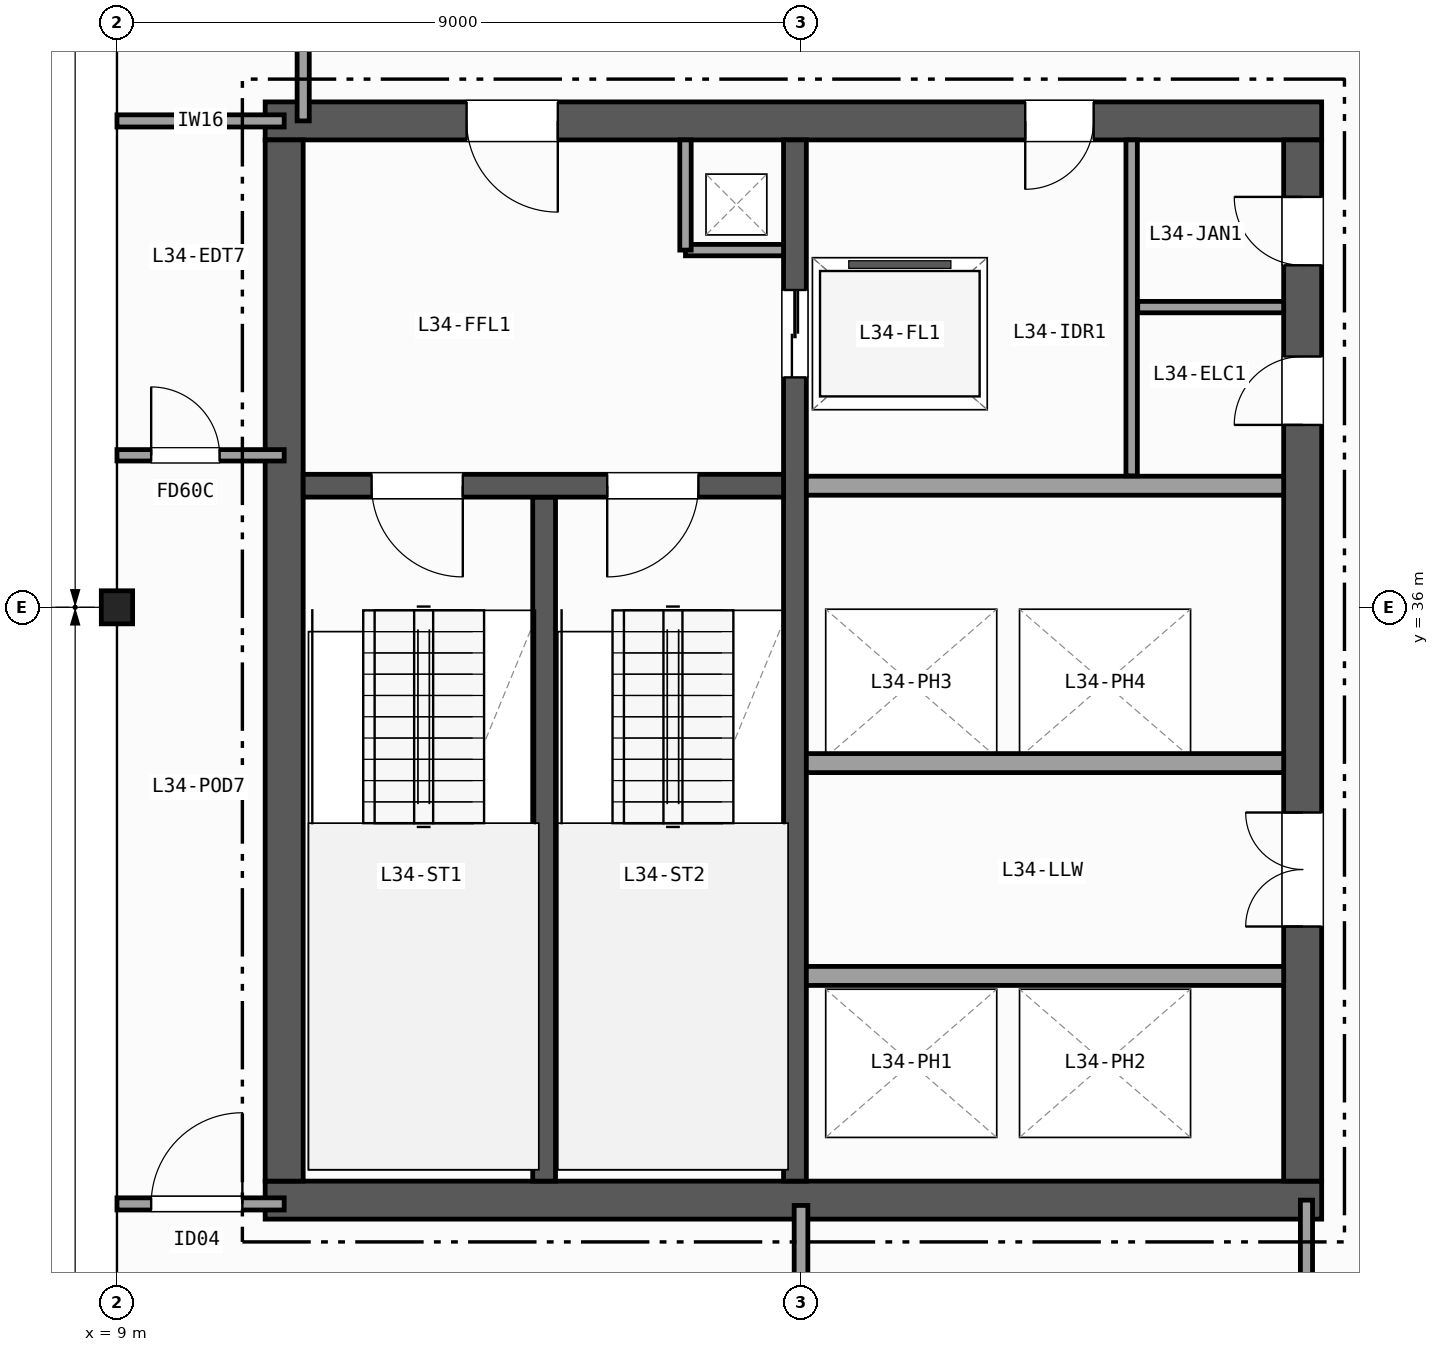
"""IFC4 building model, lengths in metres.
Left out: names, types, materials, properties, quantities, classifications, styles, units other than length and angle.
Written with IfcOpenShell. Run it as: python <this file> out.ifc"""

import sys

from ifc_helpers import new_model, si_unit, direction, frame, frame_2d, origin, origin_2d, place, context, subcontext, project, spatial, rectangle, i_section, extrude, element, fill, save


model = new_model("IFC4")
c1 = context("Model", 3, precision=1e-05, world=origin(), true_north=direction((0.0, 1.0)))
c2 = subcontext(c1, "Body", "Model", "MODEL_VIEW")
j1 = project(units=[si_unit("LENGTHUNIT", "METRE"), si_unit("PLANEANGLEUNIT", "RADIAN")], contexts=[c1])
p1 = place(None, origin())
s1 = spatial("IfcSite", under=j1, at=p1, CompositionType="ELEMENT")
p2 = place(p1, origin())
s2 = spatial("IfcBuilding", under=s1, at=p2, CompositionType="ELEMENT")
p3 = place(p2, frame((0.0, 0.0, 139.6)))
s3 = spatial("IfcBuildingStorey", under=s2, at=p3, CompositionType="ELEMENT", Elevation=139.6)
p4 = place(p3, frame((9.0, 36.0, 0.0), z_axis=(0.0, 0.0, 1.0), x_axis=(1.0, 0.0, 0.0)))
e1 = element("IfcColumn", 1, at=p4, inside=s3, PredefinedType="COLUMN", context=c2, shape_type="SweptSolid", body=[
    extrude(i_section(OverallWidth=0.412, OverallDepth=0.435, WebThickness=0.036, FlangeThickness=0.057, FilletRadius=0.015, at=origin_2d()), origin(), (0.0, 0.0, 1.0), 3.7),
])
p5 = place(p3, frame((10.95, 28.2, 0.0), z_axis=(0.0, 0.0, 1.0), x_axis=(1.0, 0.0, 0.0)))
e2 = element("IfcWall", 2, at=p5, inside=s3, PredefinedType="SHEAR", context=c2, shape_type="SweptSolid", body=[
    extrude(rectangle(XDim=13.9, YDim=0.5, at=frame_2d((6.95, 0.0))), origin(), (0.0, 0.0, 1.0), 3.42),
])
p6 = place(p3, frame((24.85, 42.4, 0.0), z_axis=(0.0, 0.0, 1.0), x_axis=(-1.0, 0.0, 0.0)))
e3 = element("IfcWall", 3, at=p6, inside=s3, PredefinedType="SHEAR", context=c2, shape_type="SweptSolid", body=[
    extrude(rectangle(XDim=13.9, YDim=0.5, at=frame_2d((6.95, 0.0))), origin(), (0.0, 0.0, 1.0), 3.42),
])
p7 = place(p6, frame((10.05, 0.0, 0.0)))
e4 = element("IfcOpeningElement", 4, at=p7, cuts=e3, PredefinedType="OPENING", context=c2, shape_type="SweptSolid", body=[
    extrude(rectangle(XDim=1.2, YDim=2.15, at=frame_2d((0.6, 1.075))), frame((0.0, 0.26, 0.0), z_axis=(0.0, -1.0, 0.0), x_axis=(1.0, 0.0, 0.0)), (0.0, 0.0, 1.0), 0.52),
])
p8 = place(p6, frame((3.0, 0.0, 0.0)))
e5 = element("IfcOpeningElement", 5, at=p8, cuts=e3, PredefinedType="OPENING", context=c2, shape_type="SweptSolid", body=[
    extrude(rectangle(XDim=0.9, YDim=2.1, at=frame_2d((0.45, 1.05))), frame((0.0, 0.26, 0.0), z_axis=(0.0, -1.0, 0.0), x_axis=(1.0, 0.0, 0.0)), (0.0, 0.0, 1.0), 0.52),
])
p9 = place(p3, frame((11.2, 42.15, 0.0), z_axis=(0.0, 0.0, 1.0), x_axis=(0.0, -1.0, 0.0)))
e6 = element("IfcWall", 6, at=p9, inside=s3, PredefinedType="SHEAR", context=c2, shape_type="SweptSolid", body=[
    extrude(rectangle(XDim=13.7, YDim=0.5, at=frame_2d((6.85, 0.0))), origin(), (0.0, 0.0, 1.0), 3.42),
])
p10 = place(p3, frame((24.6, 28.45, 0.0), z_axis=(0.0, 0.0, 1.0), x_axis=(0.0, 1.0, 0.0)))
e7 = element("IfcWall", 7, at=p10, inside=s3, PredefinedType="SHEAR", context=c2, shape_type="SweptSolid", body=[
    extrude(rectangle(XDim=13.7, YDim=0.5, at=frame_2d((6.85, 0.0))), origin(), (0.0, 0.0, 1.0), 3.42),
])
p11 = place(p10, frame((3.35, 0.0, 0.0)))
e8 = element("IfcOpeningElement", 8, at=p11, cuts=e7, PredefinedType="OPENING", context=c2, shape_type="SweptSolid", body=[
    extrude(rectangle(XDim=1.5, YDim=2.2, at=frame_2d((0.75, 1.1))), frame((0.0, 0.26, 0.0), z_axis=(0.0, -1.0, 0.0), x_axis=(1.0, 0.0, 0.0)), (0.0, 0.0, 1.0), 0.52),
])
p12 = place(p10, frame((9.95, 0.0, 0.0)))
e9 = element("IfcOpeningElement", 9, at=p12, cuts=e7, PredefinedType="OPENING", context=c2, shape_type="SweptSolid", body=[
    extrude(rectangle(XDim=0.9, YDim=2.1, at=frame_2d((0.45, 1.05))), frame((0.0, 0.26, 0.0), z_axis=(0.0, -1.0, 0.0), x_axis=(1.0, 0.0, 0.0)), (0.0, 0.0, 1.0), 0.52),
])
p13 = place(p10, frame((12.05, 0.0, 0.0)))
e10 = element("IfcOpeningElement", 10, at=p13, cuts=e7, PredefinedType="OPENING", context=c2, shape_type="SweptSolid", body=[
    extrude(rectangle(XDim=0.9, YDim=2.1, at=frame_2d((0.45, 1.05))), frame((0.0, 0.26, 0.0), z_axis=(0.0, -1.0, 0.0), x_axis=(1.0, 0.0, 0.0)), (0.0, 0.0, 1.0), 0.52),
])
p14 = place(p3, frame((14.62, 28.45, 0.0), z_axis=(0.0, 0.0, 1.0), x_axis=(0.0, 1.0, 0.0)))
e11 = element("IfcWall", 11, at=p14, inside=s3, PredefinedType="SHEAR", context=c2, shape_type="SweptSolid", body=[
    extrude(rectangle(XDim=9.0, YDim=0.3, at=frame_2d((4.5, 0.0))), origin(), (0.0, 0.0, 1.0), 3.42),
])
p15 = place(p3, frame((17.92, 42.15, 0.0), z_axis=(0.0, 0.0, 1.0), x_axis=(0.0, -1.0, 0.0)))
e12 = element("IfcWall", 12, at=p15, inside=s3, PredefinedType="SHEAR", context=c2, shape_type="SweptSolid", body=[
    extrude(rectangle(XDim=13.7, YDim=0.3, at=frame_2d((6.85, 0.0))), origin(), (0.0, 0.0, 1.0), 3.42),
])
p16 = place(p15, frame((1.975, 0.0, 0.0)))
e13 = element("IfcOpeningElement", 13, at=p16, cuts=e12, PredefinedType="OPENING", context=c2, shape_type="SweptSolid", body=[
    extrude(rectangle(XDim=1.15, YDim=2.15, at=frame_2d((0.575, 1.075))), frame((0.0, 0.16, 0.0), z_axis=(0.0, -1.0, 0.0), x_axis=(1.0, 0.0, 0.0)), (0.0, 0.0, 1.0), 0.32),
])
p17 = place(p3, frame((17.77, 37.6, 0.0), z_axis=(0.0, 0.0, 1.0), x_axis=(-1.0, 0.0, 0.0)))
e14 = element("IfcWall", 14, at=p17, inside=s3, PredefinedType="SHEAR", context=c2, shape_type="SweptSolid", body=[
    extrude(rectangle(XDim=6.32, YDim=0.3, at=frame_2d((3.16, 0.0))), origin(), (0.0, 0.0, 1.0), 3.42),
])
p18 = place(p17, frame((4.22, 0.0, 0.0)))
e15 = element("IfcOpeningElement", 15, at=p18, cuts=e14, PredefinedType="OPENING", context=c2, shape_type="SweptSolid", body=[
    extrude(rectangle(XDim=1.2, YDim=2.15, at=frame_2d((0.6, 1.075))), frame((0.0, 0.16, 0.0), z_axis=(0.0, -1.0, 0.0), x_axis=(1.0, 0.0, 0.0)), (0.0, 0.0, 1.0), 0.32),
])
p19 = place(p17, frame((1.12, 0.0, 0.0)))
e16 = element("IfcOpeningElement", 16, at=p19, cuts=e14, PredefinedType="OPENING", context=c2, shape_type="SweptSolid", body=[
    extrude(rectangle(XDim=1.2, YDim=2.15, at=frame_2d((0.6, 1.075))), frame((0.0, 0.16, 0.0), z_axis=(0.0, -1.0, 0.0), x_axis=(1.0, 0.0, 0.0)), (0.0, 0.0, 1.0), 0.32),
])
p20 = place(p3, frame((16.48, 40.7, 0.0), z_axis=(0.0, 0.0, 1.0), x_axis=(1.0, 0.0, 0.0)))
e17 = element("IfcWall", 17, at=p20, inside=s3, PredefinedType="PARTITIONING", context=c2, shape_type="SweptSolid", body=[
    extrude(rectangle(XDim=1.29, YDim=0.15, at=frame_2d((0.645, 0.0))), origin(), (0.0, 0.0, 1.0), 3.42),
])
p21 = place(p3, frame((16.48, 40.7, 0.0), z_axis=(0.0, 0.0, 1.0), x_axis=(0.0, 1.0, 0.0)))
e18 = element("IfcWall", 18, at=p21, inside=s3, PredefinedType="PARTITIONING", context=c2, shape_type="SweptSolid", body=[
    extrude(rectangle(XDim=1.45, YDim=0.15, at=frame_2d((0.725, 0.0))), origin(), (0.0, 0.0, 1.0), 3.42),
])
for number, where, z_axis, x_axis in (
    (19, (18.07, 37.6, 0.0), (0.0, 0.0, 1.0), (1.0, 0.0, 0.0)),
    (20, (18.07, 31.15, 0.0), (0.0, 0.0, 1.0), (1.0, 0.0, 0.0)),
    (21, (24.35, 33.95, 0.0), (0.0, 0.0, 1.0), (-1.0, 0.0, 0.0)),
):
    element("IfcWall", number, at=place(p3, frame(where, z_axis=z_axis, x_axis=x_axis)), inside=s3, PredefinedType="PARTITIONING", context=c2, shape_type="SweptSolid", body=[
        extrude(rectangle(XDim=6.28, YDim=0.25, at=frame_2d((3.14, 0.0))), origin(), (0.0, 0.0, 1.0), 3.42),
    ])
p22 = place(p3, frame((22.35, 37.73, 0.0), z_axis=(0.0, 0.0, 1.0), x_axis=(0.0, 1.0, 0.0)))
e22 = element("IfcWall", 22, at=p22, inside=s3, PredefinedType="PARTITIONING", context=c2, shape_type="SweptSolid", body=[
    extrude(rectangle(XDim=4.42, YDim=0.15, at=frame_2d((2.21, 0.0))), origin(), (0.0, 0.0, 1.0), 3.42),
])
p23 = place(p3, frame((22.43, 39.95, 0.0), z_axis=(0.0, 0.0, 1.0), x_axis=(1.0, 0.0, 0.0)))
e23 = element("IfcWall", 23, at=p23, inside=s3, PredefinedType="PARTITIONING", context=c2, shape_type="SweptSolid", body=[
    extrude(rectangle(XDim=1.92, YDim=0.15, at=frame_2d((0.96, 0.0))), origin(), (0.0, 0.0, 1.0), 3.42),
])
p24 = place(p3, frame((9.0, 28.15, 0.0), z_axis=(0.0, 0.0, 1.0), x_axis=(1.0, 0.0, 0.0)))
e24 = element("IfcWall", 24, at=p24, inside=s3, PredefinedType="PARTITIONING", context=c2, shape_type="SweptSolid", body=[
    extrude(rectangle(XDim=2.2, YDim=0.16, at=frame_2d((1.1, 0.0))), origin(), (0.0, 0.0, 1.0), 2.634),
])
p25 = place(p24, frame((0.45, 0.0, 0.0)))
e25 = element("IfcOpeningElement", 25, at=p25, cuts=e24, PredefinedType="OPENING", context=c2, shape_type="SweptSolid", body=[
    extrude(rectangle(XDim=1.2, YDim=2.15, at=frame_2d((0.6, 1.075))), frame((0.0, 0.09, 0.0), z_axis=(0.0, -1.0, 0.0), x_axis=(1.0, 0.0, 0.0)), (0.0, 0.0, 1.0), 0.18),
])
p26 = place(p3, frame((9.0, 42.4, 0.0), z_axis=(0.0, 0.0, 1.0), x_axis=(1.0, 0.0, 0.0)))
e26 = element("IfcWall", 26, at=p26, inside=s3, PredefinedType="PARTITIONING", context=c2, shape_type="SweptSolid", body=[
    extrude(rectangle(XDim=2.2, YDim=0.16, at=frame_2d((1.1, 0.0))), origin(), (0.0, 0.0, 1.0), 2.634),
])
p27 = place(p3, frame((11.45, 42.4, 0.0), z_axis=(0.0, 0.0, 1.0), x_axis=(0.0, 1.0, 0.0)))
e27 = element("IfcWall", 27, at=p27, inside=s3, PredefinedType="PARTITIONING", context=c2, shape_type="SweptSolid", body=[
    extrude(rectangle(XDim=2.1, YDim=0.16, at=frame_2d((1.05, 0.0))), origin(), (0.0, 0.0, 1.0), 3.42),
])
p28 = place(p3, frame((9.0, 38.0, 0.0), z_axis=(0.0, 0.0, 1.0), x_axis=(1.0, 0.0, 0.0)))
e28 = element("IfcWall", 28, at=p28, inside=s3, PredefinedType="PARTITIONING", context=c2, shape_type="SweptSolid", body=[
    extrude(rectangle(XDim=2.2, YDim=0.15, at=frame_2d((1.1, 0.0))), origin(), (0.0, 0.0, 1.0), 2.634),
])
p29 = place(p28, frame((0.45, 0.0, 0.0)))
e29 = element("IfcOpeningElement", 29, at=p29, cuts=e28, PredefinedType="OPENING", context=c2, shape_type="SweptSolid", body=[
    extrude(rectangle(XDim=0.9, YDim=2.1, at=frame_2d((0.45, 1.05))), frame((0.0, 0.085, 0.0), z_axis=(0.0, -1.0, 0.0), x_axis=(1.0, 0.0, 0.0)), (0.0, 0.0, 1.0), 0.17),
])
p30 = place(p3, frame((24.65, 9.0, 0.0), z_axis=(0.0, 0.0, 1.0), x_axis=(0.0, 1.0, 0.0)))
e30 = element("IfcWall", 30, at=p30, inside=s3, PredefinedType="PARTITIONING", context=c2, shape_type="SweptSolid", body=[
    extrude(rectangle(XDim=19.2, YDim=0.16, at=frame_2d((9.6, 0.0))), origin(), (0.0, 0.0, 1.0), 2.634),
])
p31 = place(p30, frame((3.6, 0.0, 0.0)))
e31 = element("IfcOpeningElement", 31, at=p31, cuts=e30, PredefinedType="OPENING", context=c2, shape_type="SweptSolid", body=[
    extrude(rectangle(XDim=0.95, YDim=2.1, at=frame_2d((0.475, 1.05))), frame((0.0, 0.09, 0.0), z_axis=(0.0, -1.0, 0.0), x_axis=(1.0, 0.0, 0.0)), (0.0, 0.0, 1.0), 0.18),
])
p32 = place(p30, frame((13.165, 0.0, 0.0)))
e32 = element("IfcOpeningElement", 32, at=p32, cuts=e30, PredefinedType="OPENING", context=c2, shape_type="SweptSolid", body=[
    extrude(rectangle(XDim=1.0, YDim=2.1, at=frame_2d((0.5, 1.05))), frame((0.0, 0.09, 0.0), z_axis=(0.0, -1.0, 0.0), x_axis=(1.0, 0.0, 0.0)), (0.0, 0.0, 1.0), 0.18),
])
p33 = place(p3, frame((18.0, 9.0, 0.0), z_axis=(0.0, 0.0, 1.0), x_axis=(0.0, 1.0, 0.0)))
e33 = element("IfcWall", 33, at=p33, inside=s3, PredefinedType="PARTITIONING", context=c2, shape_type="SweptSolid", body=[
    extrude(rectangle(XDim=19.13, YDim=0.18, at=frame_2d((9.565, 0.0))), origin(), (0.0, 0.0, 1.0), 2.634),
])
p34 = place(p33, frame((2.2, 0.0, 0.0)))
e34 = element("IfcOpeningElement", 34, at=p34, cuts=e33, PredefinedType="OPENING", context=c2, shape_type="SweptSolid", body=[
    extrude(rectangle(XDim=1.05, YDim=2.15, at=frame_2d((0.525, 1.075))), frame((0.0, 0.1, 0.0), z_axis=(0.0, -1.0, 0.0), x_axis=(1.0, 0.0, 0.0)), (0.0, 0.0, 1.0), 0.2),
])
p35 = place(p33, frame((13.5, 0.0, 0.0)))
e35 = element("IfcOpeningElement", 35, at=p35, cuts=e33, PredefinedType="OPENING", context=c2, shape_type="SweptSolid", body=[
    extrude(rectangle(XDim=1.2, YDim=2.15, at=frame_2d((0.6, 1.075))), frame((0.0, 0.1, 0.0), z_axis=(0.0, -1.0, 0.0), x_axis=(1.0, 0.0, 0.0)), (0.0, 0.0, 1.0), 0.2),
])
p36 = place(p18, origin())
e36 = element("IfcDoor", 36, at=p36, inside=s3, OperationType="SINGLE_SWING_LEFT", PredefinedType="DOOR", context=c2, shape_type="SweptSolid", body=[
    extrude(rectangle(XDim=1.2, YDim=2.15, at=frame_2d((0.6, 1.075))), frame((0.0, 0.025, 0.0), z_axis=(0.0, -1.0, 0.0), x_axis=(1.0, 0.0, 0.0)), (0.0, 0.0, 1.0), 0.05),
])
fill(e15, e36)
p37 = place(p19, origin())
e37 = element("IfcDoor", 37, at=p37, inside=s3, OperationType="SINGLE_SWING_RIGHT", PredefinedType="DOOR", context=c2, shape_type="SweptSolid", body=[
    extrude(rectangle(XDim=1.2, YDim=2.15, at=frame_2d((0.6, 1.075))), frame((0.0, 0.025, 0.0), z_axis=(0.0, -1.0, 0.0), x_axis=(1.0, 0.0, 0.0)), (0.0, 0.0, 1.0), 0.05),
])
fill(e16, e37)
p38 = place(p11, origin())
e38 = element("IfcDoor", 38, at=p38, inside=s3, OperationType="DOUBLE_DOOR_SINGLE_SWING", PredefinedType="DOOR", context=c2, shape_type="SweptSolid", body=[
    extrude(rectangle(XDim=1.5, YDim=2.2, at=frame_2d((0.75, 1.1))), frame((0.0, 0.025, 0.0), z_axis=(0.0, -1.0, 0.0), x_axis=(1.0, 0.0, 0.0)), (0.0, 0.0, 1.0), 0.05),
])
fill(e8, e38)
p39 = place(p7, origin())
e39 = element("IfcDoor", 39, at=p39, inside=s3, OperationType="SINGLE_SWING_LEFT", PredefinedType="DOOR", context=c2, shape_type="SweptSolid", body=[
    extrude(rectangle(XDim=1.2, YDim=2.15, at=frame_2d((0.6, 1.075))), frame((0.0, 0.025, 0.0), z_axis=(0.0, -1.0, 0.0), x_axis=(1.0, 0.0, 0.0)), (0.0, 0.0, 1.0), 0.05),
])
fill(e4, e39)
p40 = place(p12, origin())
e40 = element("IfcDoor", 40, at=p40, inside=s3, OperationType="SINGLE_SWING_LEFT", PredefinedType="DOOR", context=c2, shape_type="SweptSolid", body=[
    extrude(rectangle(XDim=0.9, YDim=2.1, at=frame_2d((0.45, 1.05))), frame((0.0, 0.025, 0.0), z_axis=(0.0, -1.0, 0.0), x_axis=(1.0, 0.0, 0.0)), (0.0, 0.0, 1.0), 0.05),
])
fill(e9, e40)
p41 = place(p8, origin())
e41 = element("IfcDoor", 41, at=p41, inside=s3, OperationType="SINGLE_SWING_RIGHT", PredefinedType="DOOR", context=c2, shape_type="SweptSolid", body=[
    extrude(rectangle(XDim=0.9, YDim=2.1, at=frame_2d((0.45, 1.05))), frame((0.0, 0.025, 0.0), z_axis=(0.0, -1.0, 0.0), x_axis=(1.0, 0.0, 0.0)), (0.0, 0.0, 1.0), 0.05),
])
fill(e5, e41)
p42 = place(p13, origin())
e42 = element("IfcDoor", 42, at=p42, inside=s3, OperationType="SINGLE_SWING_RIGHT", PredefinedType="DOOR", context=c2, shape_type="SweptSolid", body=[
    extrude(rectangle(XDim=0.9, YDim=2.1, at=frame_2d((0.45, 1.05))), frame((0.0, 0.025, 0.0), z_axis=(0.0, -1.0, 0.0), x_axis=(1.0, 0.0, 0.0)), (0.0, 0.0, 1.0), 0.05),
])
fill(e10, e42)
p43 = place(p16, origin())
e43 = element("IfcDoor", 43, at=p43, inside=s3, OperationType="DOUBLE_DOOR_SLIDING", PredefinedType="DOOR", context=c2, shape_type="SweptSolid", body=[
    extrude(rectangle(XDim=1.15, YDim=2.15, at=frame_2d((0.575, 1.075))), frame((0.0, 0.025, 0.0), z_axis=(0.0, -1.0, 0.0), x_axis=(1.0, 0.0, 0.0)), (0.0, 0.0, 1.0), 0.05),
])
fill(e13, e43)
p44 = place(p25, origin())
e44 = element("IfcDoor", 44, at=p44, inside=s3, OperationType="SINGLE_SWING_RIGHT", PredefinedType="DOOR", context=c2, shape_type="SweptSolid", body=[
    extrude(rectangle(XDim=1.2, YDim=2.15, at=frame_2d((0.6, 1.075))), frame((0.0, 0.025, 0.0), z_axis=(0.0, -1.0, 0.0), x_axis=(1.0, 0.0, 0.0)), (0.0, 0.0, 1.0), 0.05),
])
fill(e25, e44)
p45 = place(p29, origin())
e45 = element("IfcDoor", 45, at=p45, inside=s3, OperationType="SINGLE_SWING_LEFT", PredefinedType="DOOR", context=c2, shape_type="SweptSolid", body=[
    extrude(rectangle(XDim=0.9, YDim=2.1, at=frame_2d((0.45, 1.05))), frame((0.0, 0.025, 0.0), z_axis=(0.0, -1.0, 0.0), x_axis=(1.0, 0.0, 0.0)), (0.0, 0.0, 1.0), 0.05),
])
fill(e29, e45)
save(model, sys.argv[1])
